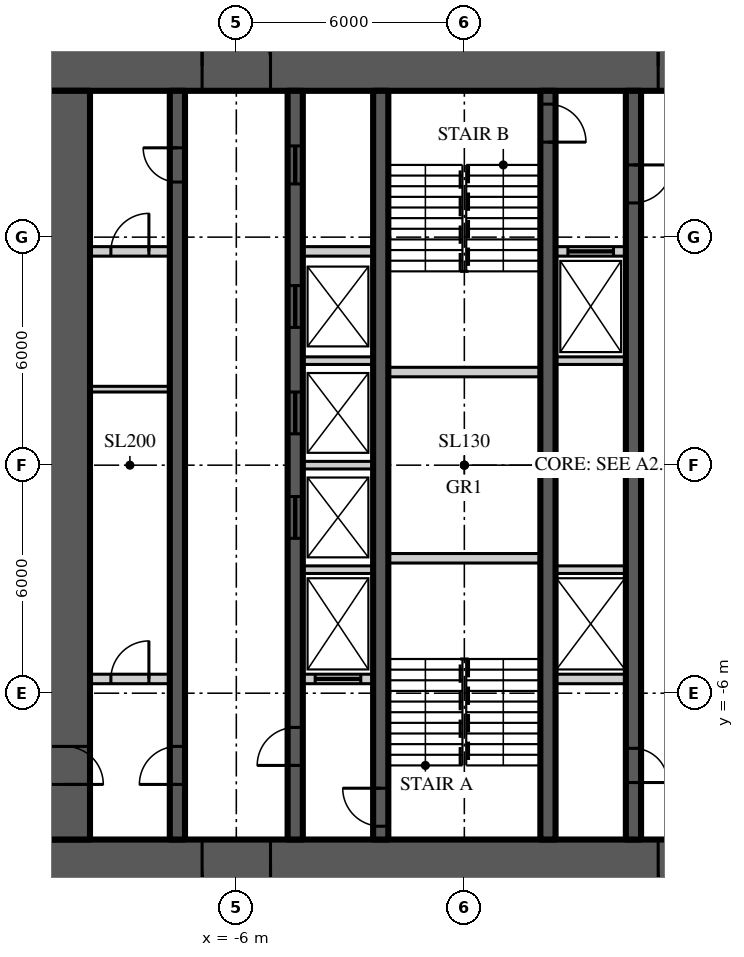
"""IFC4 building model, lengths in metres.
Left out: names, types, materials, properties, quantities, classifications, styles, units other than length and angle.
Written with IfcOpenShell. Run it as: python <this file> out.ifc"""

import sys

from ifc_helpers import new_model, si_unit, direction, frame, frame_2d, origin, place, context, subcontext, project, spatial, rectangle, extrude, element, fill, save


model = new_model("IFC4")
c1 = context("Model", 3, precision=1e-05, world=origin(), true_north=direction((0.0, 1.0)))
c2 = subcontext(c1, "Body", "Model", "MODEL_VIEW")
j1 = project(units=[si_unit("LENGTHUNIT", "METRE"), si_unit("PLANEANGLEUNIT", "RADIAN")], contexts=[c1])
p1 = place(None, origin())
s1 = spatial("IfcSite", under=j1, at=p1, CompositionType="ELEMENT")
p2 = place(p1, origin())
s2 = spatial("IfcBuilding", under=s1, at=p2, CompositionType="ELEMENT")
p3 = place(p2, frame((0.0, 0.0, 167.1)))
s3 = spatial("IfcBuildingStorey", under=s2, at=p3, CompositionType="ELEMENT", Elevation=167.1)
p4 = place(p3, frame((-11.15, 10.5, 0.0), z_axis=(0.0, 0.0, 1.0), x_axis=(1.0, 0.0, 0.0)))
e1 = element("IfcWall", 1, at=p4, inside=s3, PredefinedType="SHEAR", context=c2, shape_type="SweptSolid", body=[
    extrude(rectangle(XDim=22.3, YDim=1.3, at=frame_2d((11.15, 0.0))), origin(), (0.0, 0.0, 1.0), 3.9),
])
p5 = place(p4, frame((4.25, 0.0, 0.0)))
e2 = element("IfcOpeningElement", 2, at=p5, cuts=e1, PredefinedType="OPENING", context=c2, shape_type="SweptSolid", body=[
    extrude(rectangle(XDim=1.8, YDim=2.2, at=frame_2d((0.9, 1.1))), frame((0.0, 0.66, 0.0), z_axis=(0.0, -1.0, 0.0), x_axis=(1.0, 0.0, 0.0)), (0.0, 0.0, 1.0), 1.32),
])
p6 = place(p4, frame((16.25, 0.0, 0.0)))
e3 = element("IfcOpeningElement", 3, at=p6, cuts=e1, PredefinedType="OPENING", context=c2, shape_type="SweptSolid", body=[
    extrude(rectangle(XDim=1.8, YDim=2.2, at=frame_2d((0.9, 1.1))), frame((0.0, 0.66, 0.0), z_axis=(0.0, -1.0, 0.0), x_axis=(1.0, 0.0, 0.0)), (0.0, 0.0, 1.0), 1.32),
])
p7 = place(p3, frame((11.15, -10.5, 0.0), z_axis=(0.0, 0.0, 1.0), x_axis=(-1.0, 0.0, 0.0)))
e4 = element("IfcWall", 4, at=p7, inside=s3, PredefinedType="SHEAR", context=c2, shape_type="SweptSolid", body=[
    extrude(rectangle(XDim=22.3, YDim=1.3, at=frame_2d((11.15, 0.0))), origin(), (0.0, 0.0, 1.0), 3.9),
])
p8 = place(p7, frame((16.25, 0.0, 0.0)))
e5 = element("IfcOpeningElement", 5, at=p8, cuts=e4, PredefinedType="OPENING", context=c2, shape_type="SweptSolid", body=[
    extrude(rectangle(XDim=1.8, YDim=2.2, at=frame_2d((0.9, 1.1))), frame((0.0, 0.66, 0.0), z_axis=(0.0, -1.0, 0.0), x_axis=(1.0, 0.0, 0.0)), (0.0, 0.0, 1.0), 1.32),
])
p9 = place(p7, frame((4.25, 0.0, 0.0)))
e6 = element("IfcOpeningElement", 6, at=p9, cuts=e4, PredefinedType="OPENING", context=c2, shape_type="SweptSolid", body=[
    extrude(rectangle(XDim=1.8, YDim=2.2, at=frame_2d((0.9, 1.1))), frame((0.0, 0.66, 0.0), z_axis=(0.0, -1.0, 0.0), x_axis=(1.0, 0.0, 0.0)), (0.0, 0.0, 1.0), 1.32),
])
p10 = place(p3, frame((-10.5, 9.85, 0.0), z_axis=(0.0, 0.0, 1.0), x_axis=(0.0, -1.0, 0.0)))
e7 = element("IfcWall", 7, at=p10, inside=s3, PredefinedType="SHEAR", context=c2, shape_type="SweptSolid", body=[
    extrude(rectangle(XDim=19.7, YDim=1.3, at=frame_2d((9.85, 0.0))), origin(), (0.0, 0.0, 1.0), 3.9),
])
p11 = place(p10, frame((17.25, 0.0, 0.0)))
e8 = element("IfcOpeningElement", 8, at=p11, cuts=e7, PredefinedType="OPENING", context=c2, shape_type="SweptSolid", body=[
    extrude(rectangle(XDim=1.0, YDim=2.2, at=frame_2d((0.5, 1.1))), frame((0.0, 0.66, 0.0), z_axis=(0.0, -1.0, 0.0), x_axis=(1.0, 0.0, 0.0)), (0.0, 0.0, 1.0), 1.32),
])
p12 = place(p3, frame((-7.55, -9.85, 0.0), z_axis=(0.0, 0.0, 1.0), x_axis=(0.0, 1.0, 0.0)))
e9 = element("IfcWall", 9, at=p12, inside=s3, PredefinedType="SHEAR", context=c2, shape_type="SweptSolid", body=[
    extrude(rectangle(XDim=19.7, YDim=0.4, at=frame_2d((9.85, 0.0))), origin(), (0.0, 0.0, 1.0), 3.9),
])
p13 = place(p12, frame((1.45, 0.0, 0.0)))
e10 = element("IfcOpeningElement", 10, at=p13, cuts=e9, PredefinedType="OPENING", context=c2, shape_type="SweptSolid", body=[
    extrude(rectangle(XDim=1.0, YDim=2.2, at=frame_2d((0.5, 1.1))), frame((0.0, 0.21, 0.0), z_axis=(0.0, -1.0, 0.0), x_axis=(1.0, 0.0, 0.0)), (0.0, 0.0, 1.0), 0.42),
])
p14 = place(p12, frame((17.3, 0.0, 0.0)))
e11 = element("IfcOpeningElement", 11, at=p14, cuts=e9, PredefinedType="OPENING", context=c2, shape_type="SweptSolid", body=[
    extrude(rectangle(XDim=0.9, YDim=2.1, at=frame_2d((0.45, 1.05))), frame((0.0, 0.21, 0.0), z_axis=(0.0, -1.0, 0.0), x_axis=(1.0, 0.0, 0.0)), (0.0, 0.0, 1.0), 0.42),
])
p15 = place(p3, frame((-4.45, -9.85, 0.0), z_axis=(0.0, 0.0, 1.0), x_axis=(0.0, 1.0, 0.0)))
e12 = element("IfcWall", 12, at=p15, inside=s3, PredefinedType="SHEAR", context=c2, shape_type="SweptSolid", body=[
    extrude(rectangle(XDim=19.7, YDim=0.4, at=frame_2d((9.85, 0.0))), origin(), (0.0, 0.0, 1.0), 3.9),
])
p16 = place(p15, frame((1.95, 0.0, 0.0)))
e13 = element("IfcOpeningElement", 13, at=p16, cuts=e12, PredefinedType="OPENING", context=c2, shape_type="SweptSolid", body=[
    extrude(rectangle(XDim=1.0, YDim=2.2, at=frame_2d((0.5, 1.1))), frame((0.0, 0.21, 0.0), z_axis=(0.0, -1.0, 0.0), x_axis=(1.0, 0.0, 0.0)), (0.0, 0.0, 1.0), 0.42),
])
p17 = place(p15, frame((17.25, 0.0, 0.0)))
e14 = element("IfcOpeningElement", 14, at=p17, cuts=e12, PredefinedType="OPENING", context=c2, shape_type="SweptSolid", body=[
    extrude(rectangle(XDim=1.0, YDim=2.1, at=frame_2d((0.5, 1.05))), frame((0.0, 0.21, 0.0), z_axis=(0.0, -1.0, 0.0), x_axis=(1.0, 0.0, 0.0)), (0.0, 0.0, 1.0), 0.42),
])
p18 = place(p15, frame((7.925, 0.0, 0.0)))
e15 = element("IfcOpeningElement", 15, at=p18, cuts=e12, PredefinedType="OPENING", context=c2, shape_type="SweptSolid", body=[
    extrude(rectangle(XDim=1.1, YDim=2.2, at=frame_2d((0.55, 1.1))), frame((0.0, 0.21, 0.0), z_axis=(0.0, -1.0, 0.0), x_axis=(1.0, 0.0, 0.0)), (0.0, 0.0, 1.0), 0.42),
])
p19 = place(p15, frame((10.675, 0.0, 0.0)))
e16 = element("IfcOpeningElement", 16, at=p19, cuts=e12, PredefinedType="OPENING", context=c2, shape_type="SweptSolid", body=[
    extrude(rectangle(XDim=1.1, YDim=2.2, at=frame_2d((0.55, 1.1))), frame((0.0, 0.21, 0.0), z_axis=(0.0, -1.0, 0.0), x_axis=(1.0, 0.0, 0.0)), (0.0, 0.0, 1.0), 0.42),
])
p20 = place(p15, frame((13.475, 0.0, 0.0)))
e17 = element("IfcOpeningElement", 17, at=p20, cuts=e12, PredefinedType="OPENING", context=c2, shape_type="SweptSolid", body=[
    extrude(rectangle(XDim=1.1, YDim=2.2, at=frame_2d((0.55, 1.1))), frame((0.0, 0.21, 0.0), z_axis=(0.0, -1.0, 0.0), x_axis=(1.0, 0.0, 0.0)), (0.0, 0.0, 1.0), 0.42),
])
p21 = place(p3, frame((4.45, 9.85, 0.0), z_axis=(0.0, 0.0, 1.0), x_axis=(0.0, -1.0, 0.0)))
e18 = element("IfcWall", 18, at=p21, inside=s3, PredefinedType="SHEAR", context=c2, shape_type="SweptSolid", body=[
    extrude(rectangle(XDim=19.7, YDim=0.4, at=frame_2d((9.85, 0.0))), origin(), (0.0, 0.0, 1.0), 3.9),
])
p22 = place(p21, frame((1.95, 0.0, 0.0)))
e19 = element("IfcOpeningElement", 19, at=p22, cuts=e18, PredefinedType="OPENING", context=c2, shape_type="SweptSolid", body=[
    extrude(rectangle(XDim=1.0, YDim=2.2, at=frame_2d((0.5, 1.1))), frame((0.0, 0.21, 0.0), z_axis=(0.0, -1.0, 0.0), x_axis=(1.0, 0.0, 0.0)), (0.0, 0.0, 1.0), 0.42),
])
p23 = place(p21, frame((17.3, 0.0, 0.0)))
e20 = element("IfcOpeningElement", 20, at=p23, cuts=e18, PredefinedType="OPENING", context=c2, shape_type="SweptSolid", body=[
    extrude(rectangle(XDim=0.9, YDim=2.1, at=frame_2d((0.45, 1.05))), frame((0.0, 0.21, 0.0), z_axis=(0.0, -1.0, 0.0), x_axis=(1.0, 0.0, 0.0)), (0.0, 0.0, 1.0), 0.42),
])
p24 = place(p3, frame((-2.2, -9.85, 0.0), z_axis=(0.0, 0.0, 1.0), x_axis=(0.0, 1.0, 0.0)))
e21 = element("IfcWall", 21, at=p24, inside=s3, PredefinedType="SHEAR", context=c2, shape_type="SweptSolid", body=[
    extrude(rectangle(XDim=19.7, YDim=0.4, at=frame_2d((9.85, 0.0))), origin(), (0.0, 0.0, 1.0), 3.9),
])
p25 = place(p24, frame((0.35, 0.0, 0.0)))
e22 = element("IfcOpeningElement", 22, at=p25, cuts=e21, PredefinedType="OPENING", context=c2, shape_type="SweptSolid", body=[
    extrude(rectangle(XDim=1.0, YDim=2.2, at=frame_2d((0.5, 1.1))), frame((0.0, 0.21, 0.0), z_axis=(0.0, -1.0, 0.0), x_axis=(1.0, 0.0, 0.0)), (0.0, 0.0, 1.0), 0.42),
])
p26 = place(p3, frame((2.2, 9.85, 0.0), z_axis=(0.0, 0.0, 1.0), x_axis=(0.0, -1.0, 0.0)))
e23 = element("IfcWall", 23, at=p26, inside=s3, PredefinedType="SHEAR", context=c2, shape_type="SweptSolid", body=[
    extrude(rectangle(XDim=19.7, YDim=0.4, at=frame_2d((9.85, 0.0))), origin(), (0.0, 0.0, 1.0), 3.9),
])
p27 = place(p26, frame((0.35, 0.0, 0.0)))
e24 = element("IfcOpeningElement", 24, at=p27, cuts=e23, PredefinedType="OPENING", context=c2, shape_type="SweptSolid", body=[
    extrude(rectangle(XDim=1.0, YDim=2.2, at=frame_2d((0.5, 1.1))), frame((0.0, 0.21, 0.0), z_axis=(0.0, -1.0, 0.0), x_axis=(1.0, 0.0, 0.0)), (0.0, 0.0, 1.0), 0.42),
])
p28 = place(p3, frame((-9.85, 5.625, 0.0), z_axis=(0.0, 0.0, 1.0), x_axis=(1.0, 0.0, 0.0)))
e25 = element("IfcWall", 25, at=p28, inside=s3, PredefinedType="SOLIDWALL", context=c2, shape_type="SweptSolid", body=[
    extrude(rectangle(XDim=2.1, YDim=0.25, at=frame_2d((1.05, 0.0))), origin(), (0.0, 0.0, 1.0), 3.7),
])
p29 = place(p28, frame((0.55, 0.0, 0.0)))
e26 = element("IfcOpeningElement", 26, at=p29, cuts=e25, PredefinedType="OPENING", context=c2, shape_type="SweptSolid", body=[
    extrude(rectangle(XDim=1.0, YDim=2.2, at=frame_2d((0.5, 1.1))), frame((0.0, 0.135, 0.0), z_axis=(0.0, -1.0, 0.0), x_axis=(1.0, 0.0, 0.0)), (0.0, 0.0, 1.0), 0.27),
])
p30 = place(p3, frame((-4.25, 5.625, 0.0), z_axis=(0.0, 0.0, 1.0), x_axis=(1.0, 0.0, 0.0)))
e27 = element("IfcWall", 27, at=p30, inside=s3, PredefinedType="SOLIDWALL", context=c2, shape_type="SweptSolid", body=[
    extrude(rectangle(XDim=1.85, YDim=0.25, at=frame_2d((0.925, 0.0))), origin(), (0.0, 0.0, 1.0), 3.7),
])
p31 = place(p3, frame((2.4, 5.625, 0.0), z_axis=(0.0, 0.0, 1.0), x_axis=(1.0, 0.0, 0.0)))
e28 = element("IfcWall", 28, at=p31, inside=s3, PredefinedType="SOLIDWALL", context=c2, shape_type="SweptSolid", body=[
    extrude(rectangle(XDim=1.85, YDim=0.25, at=frame_2d((0.925, 0.0))), origin(), (0.0, 0.0, 1.0), 3.7),
])
p32 = place(p31, frame((0.325, 0.0, 0.0)))
e29 = element("IfcOpeningElement", 29, at=p32, cuts=e28, PredefinedType="OPENING", context=c2, shape_type="SweptSolid", body=[
    extrude(rectangle(XDim=1.2, YDim=2.2, at=frame_2d((0.6, 1.1))), frame((0.0, 0.135, 0.0), z_axis=(0.0, -1.0, 0.0), x_axis=(1.0, 0.0, 0.0)), (0.0, 0.0, 1.0), 0.27),
])
p33 = place(p3, frame((-9.85, -5.625, 0.0), z_axis=(0.0, 0.0, 1.0), x_axis=(1.0, 0.0, 0.0)))
e30 = element("IfcWall", 30, at=p33, inside=s3, PredefinedType="SOLIDWALL", context=c2, shape_type="SweptSolid", body=[
    extrude(rectangle(XDim=2.1, YDim=0.25, at=frame_2d((1.05, 0.0))), origin(), (0.0, 0.0, 1.0), 3.7),
])
p34 = place(p33, frame((0.55, 0.0, 0.0)))
e31 = element("IfcOpeningElement", 31, at=p34, cuts=e30, PredefinedType="OPENING", context=c2, shape_type="SweptSolid", body=[
    extrude(rectangle(XDim=1.0, YDim=2.2, at=frame_2d((0.5, 1.1))), frame((0.0, 0.135, 0.0), z_axis=(0.0, -1.0, 0.0), x_axis=(1.0, 0.0, 0.0)), (0.0, 0.0, 1.0), 0.27),
])
p35 = place(p3, frame((-4.25, -5.625, 0.0), z_axis=(0.0, 0.0, 1.0), x_axis=(1.0, 0.0, 0.0)))
e32 = element("IfcWall", 32, at=p35, inside=s3, PredefinedType="SOLIDWALL", context=c2, shape_type="SweptSolid", body=[
    extrude(rectangle(XDim=1.85, YDim=0.25, at=frame_2d((0.925, 0.0))), origin(), (0.0, 0.0, 1.0), 3.7),
])
p36 = place(p35, frame((0.325, 0.0, 0.0)))
e33 = element("IfcOpeningElement", 33, at=p36, cuts=e32, PredefinedType="OPENING", context=c2, shape_type="SweptSolid", body=[
    extrude(rectangle(XDim=1.2, YDim=2.2, at=frame_2d((0.6, 1.1))), frame((0.0, 0.135, 0.0), z_axis=(0.0, -1.0, 0.0), x_axis=(1.0, 0.0, 0.0)), (0.0, 0.0, 1.0), 0.27),
])
p37 = place(p3, frame((2.4, -5.625, 0.0), z_axis=(0.0, 0.0, 1.0), x_axis=(1.0, 0.0, 0.0)))
e34 = element("IfcWall", 34, at=p37, inside=s3, PredefinedType="SOLIDWALL", context=c2, shape_type="SweptSolid", body=[
    extrude(rectangle(XDim=1.85, YDim=0.25, at=frame_2d((0.925, 0.0))), origin(), (0.0, 0.0, 1.0), 3.7),
])
for number, where, z_axis, x_axis in (
    (35, (-2.0, -2.45, 0.0), (0.0, 0.0, 1.0), (1.0, 0.0, 0.0)),
    (36, (-2.0, 2.45, 0.0), (0.0, 0.0, 1.0), (1.0, 0.0, 0.0)),
):
    element("IfcWall", number, at=place(p3, frame(where, z_axis=z_axis, x_axis=x_axis)), inside=s3, PredefinedType="SOLIDWALL", context=c2, shape_type="SweptSolid", body=[
        extrude(rectangle(XDim=4.0, YDim=0.25, at=frame_2d((2.0, 0.0))), origin(), (0.0, 0.0, 1.0), 3.7),
    ])
for number, where, z_axis, x_axis in (
    (37, (-4.25, -2.75, 0.0), (0.0, 0.0, 1.0), (1.0, 0.0, 0.0)),
    (38, (2.4, -2.75, 0.0), (0.0, 0.0, 1.0), (1.0, 0.0, 0.0)),
    (39, (-4.25, 0.0, 0.0), (0.0, 0.0, 1.0), (1.0, 0.0, 0.0)),
    (40, (-4.25, 2.75, 0.0), (0.0, 0.0, 1.0), (1.0, 0.0, 0.0)),
    (41, (2.4, 2.75, 0.0), (0.0, 0.0, 1.0), (1.0, 0.0, 0.0)),
):
    element("IfcWall", number, at=place(p3, frame(where, z_axis=z_axis, x_axis=x_axis)), inside=s3, PredefinedType="SOLIDWALL", context=c2, shape_type="SweptSolid", body=[
        extrude(rectangle(XDim=1.85, YDim=0.2, at=frame_2d((0.925, 0.0))), origin(), (0.0, 0.0, 1.0), 3.7),
    ])
p38 = place(p3, frame((-9.85, 2.0, 0.0), z_axis=(0.0, 0.0, 1.0), x_axis=(1.0, 0.0, 0.0)))
e42 = element("IfcWall", 42, at=p38, inside=s3, PredefinedType="SOLIDWALL", context=c2, shape_type="SweptSolid", body=[
    extrude(rectangle(XDim=2.1, YDim=0.15, at=frame_2d((1.05, 0.0))), origin(), (0.0, 0.0, 1.0), 3.77),
])
p39 = place(p5, origin())
e43 = element("IfcDoor", 43, at=p39, inside=s3, OperationType="DOUBLE_DOOR_DOUBLE_SWING", PredefinedType="DOOR", context=c2, shape_type="SweptSolid", body=[
    extrude(rectangle(XDim=1.8, YDim=2.2, at=frame_2d((0.9, 1.1))), frame((0.0, 0.025, 0.0), z_axis=(0.0, -1.0, 0.0), x_axis=(1.0, 0.0, 0.0)), (0.0, 0.0, 1.0), 0.05),
])
fill(e2, e43)
p40 = place(p8, origin())
e44 = element("IfcDoor", 44, at=p40, inside=s3, OperationType="DOUBLE_DOOR_DOUBLE_SWING", PredefinedType="DOOR", context=c2, shape_type="SweptSolid", body=[
    extrude(rectangle(XDim=1.8, YDim=2.2, at=frame_2d((0.9, 1.1))), frame((0.0, 0.025, 0.0), z_axis=(0.0, -1.0, 0.0), x_axis=(1.0, 0.0, 0.0)), (0.0, 0.0, 1.0), 0.05),
])
fill(e5, e44)
p41 = place(p6, origin())
e45 = element("IfcDoor", 45, at=p41, inside=s3, OperationType="DOUBLE_DOOR_DOUBLE_SWING", PredefinedType="DOOR", context=c2, shape_type="SweptSolid", body=[
    extrude(rectangle(XDim=1.8, YDim=2.2, at=frame_2d((0.9, 1.1))), frame((0.0, 0.025, 0.0), z_axis=(0.0, -1.0, 0.0), x_axis=(1.0, 0.0, 0.0)), (0.0, 0.0, 1.0), 0.05),
])
fill(e3, e45)
p42 = place(p9, origin())
e46 = element("IfcDoor", 46, at=p42, inside=s3, OperationType="DOUBLE_DOOR_DOUBLE_SWING", PredefinedType="DOOR", context=c2, shape_type="SweptSolid", body=[
    extrude(rectangle(XDim=1.8, YDim=2.2, at=frame_2d((0.9, 1.1))), frame((0.0, 0.025, 0.0), z_axis=(0.0, -1.0, 0.0), x_axis=(1.0, 0.0, 0.0)), (0.0, 0.0, 1.0), 0.05),
])
fill(e6, e46)
p43 = place(p13, origin())
e47 = element("IfcDoor", 47, at=p43, inside=s3, OperationType="SINGLE_SWING_LEFT", PredefinedType="DOOR", context=c2, shape_type="SweptSolid", body=[
    extrude(rectangle(XDim=1.0, YDim=2.2, at=frame_2d((0.5, 1.1))), frame((0.0, 0.025, 0.0), z_axis=(0.0, -1.0, 0.0), x_axis=(1.0, 0.0, 0.0)), (0.0, 0.0, 1.0), 0.05),
])
fill(e10, e47)
p44 = place(p11, origin())
e48 = element("IfcDoor", 48, at=p44, inside=s3, OperationType="SINGLE_SWING_RIGHT", PredefinedType="DOOR", context=c2, shape_type="SweptSolid", body=[
    extrude(rectangle(XDim=1.0, YDim=2.2, at=frame_2d((0.5, 1.1))), frame((0.0, 0.025, 0.0), z_axis=(0.0, -1.0, 0.0), x_axis=(1.0, 0.0, 0.0)), (0.0, 0.0, 1.0), 0.05),
])
fill(e8, e48)
p45 = place(p16, origin())
e49 = element("IfcDoor", 49, at=p45, inside=s3, OperationType="SINGLE_SWING_LEFT", PredefinedType="DOOR", context=c2, shape_type="SweptSolid", body=[
    extrude(rectangle(XDim=1.0, YDim=2.2, at=frame_2d((0.5, 1.1))), frame((0.0, 0.025, 0.0), z_axis=(0.0, -1.0, 0.0), x_axis=(1.0, 0.0, 0.0)), (0.0, 0.0, 1.0), 0.05),
])
fill(e13, e49)
p46 = place(p25, origin())
e50 = element("IfcDoor", 50, at=p46, inside=s3, OperationType="SINGLE_SWING_RIGHT", PredefinedType="DOOR", context=c2, shape_type="SweptSolid", body=[
    extrude(rectangle(XDim=1.0, YDim=2.2, at=frame_2d((0.5, 1.1))), frame((0.0, 0.025, 0.0), z_axis=(0.0, -1.0, 0.0), x_axis=(1.0, 0.0, 0.0)), (0.0, 0.0, 1.0), 0.05),
])
fill(e22, e50)
p47 = place(p22, origin())
e51 = element("IfcDoor", 51, at=p47, inside=s3, OperationType="SINGLE_SWING_LEFT", PredefinedType="DOOR", context=c2, shape_type="SweptSolid", body=[
    extrude(rectangle(XDim=1.0, YDim=2.2, at=frame_2d((0.5, 1.1))), frame((0.0, 0.025, 0.0), z_axis=(0.0, -1.0, 0.0), x_axis=(1.0, 0.0, 0.0)), (0.0, 0.0, 1.0), 0.05),
])
fill(e19, e51)
p48 = place(p27, origin())
e52 = element("IfcDoor", 52, at=p48, inside=s3, OperationType="SINGLE_SWING_RIGHT", PredefinedType="DOOR", context=c2, shape_type="SweptSolid", body=[
    extrude(rectangle(XDim=1.0, YDim=2.2, at=frame_2d((0.5, 1.1))), frame((0.0, 0.025, 0.0), z_axis=(0.0, -1.0, 0.0), x_axis=(1.0, 0.0, 0.0)), (0.0, 0.0, 1.0), 0.05),
])
fill(e24, e52)
p49 = place(p14, origin())
e53 = element("IfcDoor", 53, at=p49, inside=s3, OperationType="SINGLE_SWING_RIGHT", PredefinedType="DOOR", context=c2, shape_type="SweptSolid", body=[
    extrude(rectangle(XDim=0.9, YDim=2.1, at=frame_2d((0.45, 1.05))), frame((0.0, 0.025, 0.0), z_axis=(0.0, -1.0, 0.0), x_axis=(1.0, 0.0, 0.0)), (0.0, 0.0, 1.0), 0.05),
])
fill(e11, e53)
p50 = place(p17, origin())
e54 = element("IfcDoor", 54, at=p50, inside=s3, OperationType="SLIDING_TO_LEFT", PredefinedType="DOOR", context=c2, shape_type="SweptSolid", body=[
    extrude(rectangle(XDim=1.0, YDim=2.1, at=frame_2d((0.5, 1.05))), frame((0.0, 0.025, 0.0), z_axis=(0.0, -1.0, 0.0), x_axis=(1.0, 0.0, 0.0)), (0.0, 0.0, 1.0), 0.05),
])
fill(e14, e54)
p51 = place(p23, origin())
e55 = element("IfcDoor", 55, at=p51, inside=s3, OperationType="SINGLE_SWING_RIGHT", PredefinedType="DOOR", context=c2, shape_type="SweptSolid", body=[
    extrude(rectangle(XDim=0.9, YDim=2.1, at=frame_2d((0.45, 1.05))), frame((0.0, 0.025, 0.0), z_axis=(0.0, -1.0, 0.0), x_axis=(1.0, 0.0, 0.0)), (0.0, 0.0, 1.0), 0.05),
])
fill(e20, e55)
p52 = place(p18, origin())
e56 = element("IfcDoor", 56, at=p52, inside=s3, OperationType="SLIDING_TO_LEFT", PredefinedType="DOOR", context=c2, shape_type="SweptSolid", body=[
    extrude(rectangle(XDim=1.1, YDim=2.2, at=frame_2d((0.55, 1.1))), frame((0.0, 0.025, 0.0), z_axis=(0.0, -1.0, 0.0), x_axis=(1.0, 0.0, 0.0)), (0.0, 0.0, 1.0), 0.05),
])
fill(e15, e56)
p53 = place(p19, origin())
e57 = element("IfcDoor", 57, at=p53, inside=s3, OperationType="SLIDING_TO_LEFT", PredefinedType="DOOR", context=c2, shape_type="SweptSolid", body=[
    extrude(rectangle(XDim=1.1, YDim=2.2, at=frame_2d((0.55, 1.1))), frame((0.0, 0.025, 0.0), z_axis=(0.0, -1.0, 0.0), x_axis=(1.0, 0.0, 0.0)), (0.0, 0.0, 1.0), 0.05),
])
fill(e16, e57)
p54 = place(p20, origin())
e58 = element("IfcDoor", 58, at=p54, inside=s3, OperationType="SLIDING_TO_LEFT", PredefinedType="DOOR", context=c2, shape_type="SweptSolid", body=[
    extrude(rectangle(XDim=1.1, YDim=2.2, at=frame_2d((0.55, 1.1))), frame((0.0, 0.025, 0.0), z_axis=(0.0, -1.0, 0.0), x_axis=(1.0, 0.0, 0.0)), (0.0, 0.0, 1.0), 0.05),
])
fill(e17, e58)
p55 = place(p36, origin())
e59 = element("IfcDoor", 59, at=p55, inside=s3, OperationType="SLIDING_TO_LEFT", PredefinedType="DOOR", context=c2, shape_type="SweptSolid", body=[
    extrude(rectangle(XDim=1.2, YDim=2.2, at=frame_2d((0.6, 1.1))), frame((0.0, 0.025, 0.0), z_axis=(0.0, -1.0, 0.0), x_axis=(1.0, 0.0, 0.0)), (0.0, 0.0, 1.0), 0.05),
])
fill(e33, e59)
p56 = place(p32, origin())
e60 = element("IfcDoor", 60, at=p56, inside=s3, OperationType="SLIDING_TO_LEFT", PredefinedType="DOOR", context=c2, shape_type="SweptSolid", body=[
    extrude(rectangle(XDim=1.2, YDim=2.2, at=frame_2d((0.6, 1.1))), frame((0.0, 0.025, 0.0), z_axis=(0.0, -1.0, 0.0), x_axis=(1.0, 0.0, 0.0)), (0.0, 0.0, 1.0), 0.05),
])
fill(e29, e60)
p57 = place(p29, origin())
e61 = element("IfcDoor", 61, at=p57, inside=s3, OperationType="SINGLE_SWING_RIGHT", PredefinedType="DOOR", context=c2, shape_type="SweptSolid", body=[
    extrude(rectangle(XDim=1.0, YDim=2.2, at=frame_2d((0.5, 1.1))), frame((0.0, 0.025, 0.0), z_axis=(0.0, -1.0, 0.0), x_axis=(1.0, 0.0, 0.0)), (0.0, 0.0, 1.0), 0.05),
])
fill(e26, e61)
p58 = place(p34, origin())
e62 = element("IfcDoor", 62, at=p58, inside=s3, OperationType="SINGLE_SWING_RIGHT", PredefinedType="DOOR", context=c2, shape_type="SweptSolid", body=[
    extrude(rectangle(XDim=1.0, YDim=2.2, at=frame_2d((0.5, 1.1))), frame((0.0, 0.025, 0.0), z_axis=(0.0, -1.0, 0.0), x_axis=(1.0, 0.0, 0.0)), (0.0, 0.0, 1.0), 0.05),
])
fill(e31, e62)
save(model, sys.argv[1])
